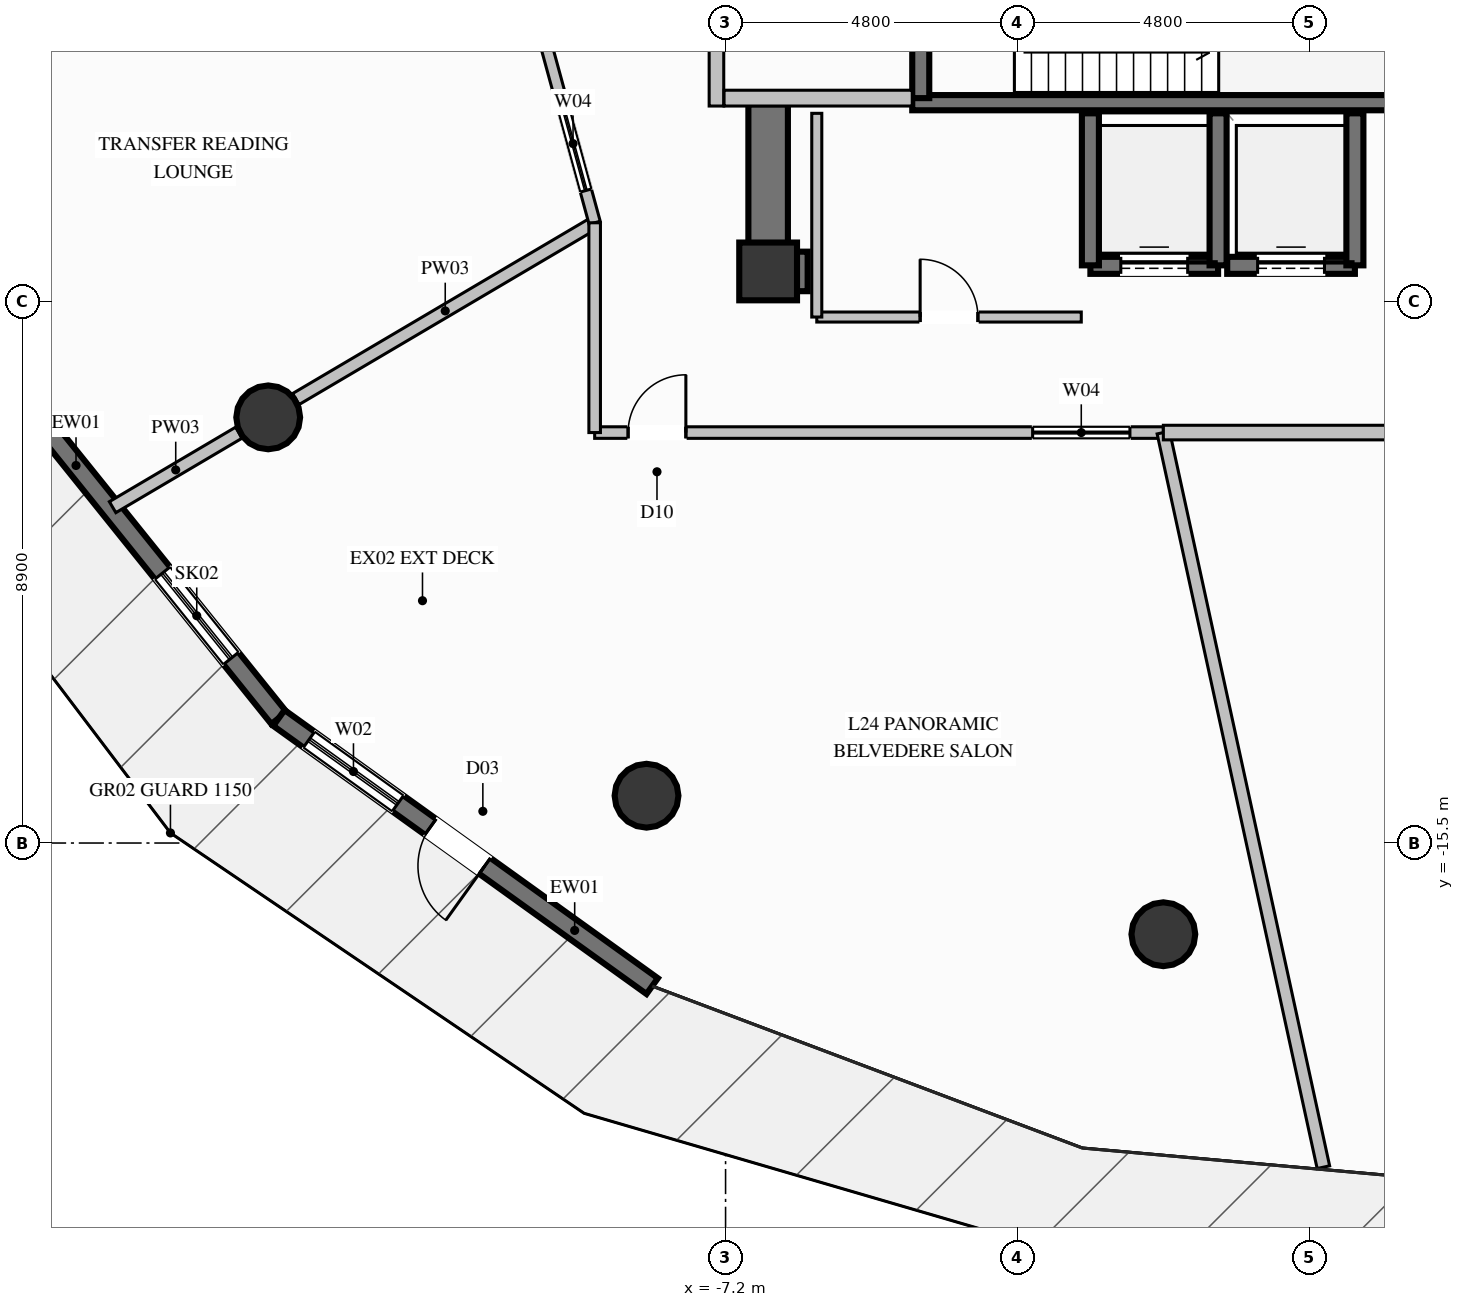
"""IFC4 building model, lengths in metres.
Left out: names, types, materials, properties, quantities, classifications, styles, units other than length and angle.
Written with IfcOpenShell. Run it as: python <this file> out.ifc"""

import sys

from ifc_helpers import new_model, si_unit, direction, frame, frame_2d, origin, origin_2d, place, context, subcontext, project, spatial, rectangle, circle, extrude, element, fill, save


model = new_model("IFC4")
c1 = context("Model", 3, precision=1e-05, world=origin(), true_north=direction((0.0, 1.0)))
c2 = subcontext(c1, "Body", "Model", "MODEL_VIEW")
j1 = project(units=[si_unit("LENGTHUNIT", "METRE"), si_unit("PLANEANGLEUNIT", "RADIAN")], contexts=[c1])
p1 = place(None, origin())
s1 = spatial("IfcSite", under=j1, at=p1, CompositionType="ELEMENT")
p2 = place(p1, origin())
s2 = spatial("IfcBuilding", under=s1, at=p2, CompositionType="ELEMENT")
p3 = place(p2, frame((0.0, 0.0, 98.0)))
s3 = spatial("IfcBuildingStorey", under=s2, at=p3, CompositionType="ELEMENT", Elevation=98.0)
p4 = place(p3, frame((-6.5, -6.1, 0.0), z_axis=(0.0, 0.0, 1.0), x_axis=(1.0, 0.0, 0.0)))
e1 = element("IfcColumn", 1, at=p4, inside=s3, PredefinedType="COLUMN", context=c2, shape_type="SweptSolid", body=[
    extrude(rectangle(XDim=0.95, YDim=0.95, at=origin_2d()), origin(), (0.0, 0.0, 1.0), 4.6),
])
p5 = place(p3, frame((-4.13, -3.325, 0.0), z_axis=(0.0, 0.0, 1.0), x_axis=(1.0, 0.0, 0.0)))
e2 = element("IfcWall", 2, at=p5, inside=s3, PredefinedType="SOLIDWALL", context=c2, shape_type="SweptSolid", body=[
    extrude(rectangle(XDim=8.26, YDim=0.25, at=frame_2d((4.13, 0.0))), origin(), (0.0, 0.0, 1.0), 4.6),
])
p6 = place(p3, frame((-6.175, -6.1, 0.0), z_axis=(0.0, 0.0, 1.0), x_axis=(1.0, 0.0, 0.0)))
e3 = element("IfcWall", 3, at=p6, inside=s3, PredefinedType="SHEAR", context=c2, shape_type="SweptSolid", body=[
    extrude(rectangle(XDim=0.325, YDim=0.65, at=frame_2d((0.163, 0.0))), origin(), (0.0, 0.0, 1.0), 4.6),
])
p7 = place(p3, frame((-6.5, -6.425, 0.0), z_axis=(0.0, 0.0, 1.0), x_axis=(0.0, 1.0, 0.0)))
e4 = element("IfcWall", 4, at=p7, inside=s3, PredefinedType="SHEAR", context=c2, shape_type="SweptSolid", body=[
    extrude(rectangle(XDim=3.075, YDim=0.65, at=frame_2d((1.538, 0.0))), origin(), (0.0, 0.0, 1.0), 4.6),
])
for number, where, z_axis, x_axis in (
    (5, (-14.722, -8.5, 0.0), (0.0, 0.0, 1.0), (1.0, 0.0, 0.0)),
    (6, (-8.5, -14.722, 0.0), (0.0, 0.0, 1.0), (1.0, 0.0, 0.0)),
    (7, (0.0, -17.0, 0.0), (0.0, 0.0, 1.0), (1.0, 0.0, 0.0)),
):
    element("IfcColumn", number, at=place(p3, frame(where, z_axis=z_axis, x_axis=x_axis)), inside=s3, PredefinedType="COLUMN", context=c2, shape_type="SweptSolid", body=[
        extrude(circle(Radius=0.525, at=origin_2d()), origin(), (0.0, 0.0, 1.0), 4.6),
    ])
p8 = place(p3, frame((-14.546, -13.443, 0.0), z_axis=(0.0, 0.0, 1.0), x_axis=(-0.626452409109, 0.77945967126, 0.0)))
e8 = element("IfcWall", 8, at=p8, inside=s3, PredefinedType="SOLIDWALL", context=c2, shape_type="SweptSolid", body=[
    extrude(rectangle(XDim=7.346, YDim=0.32, at=frame_2d((3.673, 0.0))), origin(), (0.0, 0.0, 1.0), 4.35),
])
p9 = place(p8, frame((1.257, 0.0, 0.6)))
e9 = element("IfcOpeningElement", 9, at=p9, cuts=e8, PredefinedType="OPENING", context=c2, shape_type="SweptSolid", body=[
    extrude(rectangle(XDim=1.8, YDim=2.2, at=frame_2d((0.9, 1.1))), frame((0.0, 0.17, 0.0), z_axis=(0.0, -1.0, 0.0), x_axis=(1.0, 0.0, 0.0)), (0.0, 0.0, 1.0), 0.34),
])
p10 = place(p3, frame((-8.407, -17.853, 0.0), z_axis=(0.0, 0.0, 1.0), x_axis=(-0.812167938926, 0.583423721647, 0.0)))
e10 = element("IfcWall", 10, at=p10, inside=s3, PredefinedType="SOLIDWALL", context=c2, shape_type="SweptSolid", body=[
    extrude(rectangle(XDim=7.559, YDim=0.32, at=frame_2d((3.779, 0.0))), origin(), (0.0, 0.0, 1.0), 4.35),
])
p11 = place(p10, frame((5.149, 0.0, 0.35)))
e11 = element("IfcOpeningElement", 11, at=p11, cuts=e10, PredefinedType="OPENING", context=c2, shape_type="SweptSolid", body=[
    extrude(rectangle(XDim=1.8, YDim=2.6, at=frame_2d((0.9, 1.3))), frame((0.0, 0.17, 0.0), z_axis=(0.0, -1.0, 0.0), x_axis=(1.0, 0.0, 0.0)), (0.0, 0.0, 1.0), 0.34),
])
p12 = place(p10, frame((3.389, 0.0, 0.0)))
e12 = element("IfcOpeningElement", 12, at=p12, cuts=e10, PredefinedType="OPENING", context=c2, shape_type="SweptSolid", body=[
    extrude(rectangle(XDim=1.1, YDim=2.2, at=frame_2d((0.55, 1.1))), frame((0.0, 0.17, 0.0), z_axis=(0.0, -1.0, 0.0), x_axis=(1.0, 0.0, 0.0)), (0.0, 0.0, 1.0), 0.34),
])
p13 = place(p3, frame((-1.2, -6.0, 0.0), z_axis=(0.0, 0.0, 1.0), x_axis=(1.0, 0.0, 0.0)))
e13 = element("IfcWall", 13, at=p13, inside=s3, PredefinedType="SOLIDWALL", context=c2, shape_type="SweptSolid", body=[
    extrude(rectangle(XDim=2.1, YDim=0.28, at=frame_2d((1.05, 0.0))), origin(), (0.0, 0.0, 1.0), 4.35),
])
p14 = place(p13, frame((0.5, 0.0, 0.0)))
e14 = element("IfcOpeningElement", 14, at=p14, cuts=e13, PredefinedType="OPENING", context=c2, shape_type="SweptSolid", body=[
    extrude(rectangle(XDim=1.1, YDim=2.2, at=frame_2d((0.55, 1.1))), frame((0.0, 0.15, 0.0), z_axis=(0.0, -1.0, 0.0), x_axis=(1.0, 0.0, 0.0)), (0.0, 0.0, 1.0), 0.3),
])
for number, where, z_axis, x_axis in (
    (15, (-1.2, -3.5, 0.0), (0.0, 0.0, 1.0), (0.0, -1.0, 0.0)),
    (16, (0.9, -6.0, 0.0), (0.0, 0.0, 1.0), (0.0, 1.0, 0.0)),
):
    element("IfcWall", number, at=place(p3, frame(where, z_axis=z_axis, x_axis=x_axis)), inside=s3, PredefinedType="SOLIDWALL", context=c2, shape_type="SweptSolid", body=[
        extrude(rectangle(XDim=2.5, YDim=0.28, at=frame_2d((1.25, 0.0))), origin(), (0.0, 0.0, 1.0), 4.35),
    ])
p15 = place(p3, frame((1.05, -6.0, 0.0), z_axis=(0.0, 0.0, 1.0), x_axis=(1.0, 0.0, 0.0)))
e17 = element("IfcWall", 17, at=p15, inside=s3, PredefinedType="SOLIDWALL", context=c2, shape_type="SweptSolid", body=[
    extrude(rectangle(XDim=2.1, YDim=0.28, at=frame_2d((1.05, 0.0))), origin(), (0.0, 0.0, 1.0), 4.35),
])
p16 = place(p15, frame((0.5, 0.0, 0.0)))
e18 = element("IfcOpeningElement", 18, at=p16, cuts=e17, PredefinedType="OPENING", context=c2, shape_type="SweptSolid", body=[
    extrude(rectangle(XDim=1.1, YDim=2.2, at=frame_2d((0.55, 1.1))), frame((0.0, 0.15, 0.0), z_axis=(0.0, -1.0, 0.0), x_axis=(1.0, 0.0, 0.0)), (0.0, 0.0, 1.0), 0.3),
])
p17 = place(p3, frame((3.15, -6.0, 0.0), z_axis=(0.0, 0.0, 1.0), x_axis=(0.0, 1.0, 0.0)))
e19 = element("IfcWall", 19, at=p17, inside=s3, PredefinedType="SOLIDWALL", context=c2, shape_type="SweptSolid", body=[
    extrude(rectangle(XDim=2.5, YDim=0.28, at=frame_2d((1.25, 0.0))), origin(), (0.0, 0.0, 1.0), 4.35),
])
p18 = place(p3, frame((-3.99, -3.25, 0.0), z_axis=(0.0, 0.0, 1.0), x_axis=(0.0, 1.0, 0.0)))
e20 = element("IfcWall", 20, at=p18, inside=s3, PredefinedType="SOLIDWALL", context=c2, shape_type="SweptSolid", body=[
    extrude(rectangle(XDim=5.46, YDim=0.28, at=frame_2d((2.73, 0.0))), origin(), (0.0, 0.0, 1.0), 4.35),
])
p19 = place(p18, frame((0.937, 0.0, 0.0)))
e21 = element("IfcOpeningElement", 21, at=p19, cuts=e20, PredefinedType="OPENING", context=c2, shape_type="SweptSolid", body=[
    extrude(rectangle(XDim=1.2, YDim=2.2, at=frame_2d((0.6, 1.1))), frame((0.0, 0.15, 0.0), z_axis=(0.0, -1.0, 0.0), x_axis=(1.0, 0.0, 0.0)), (0.0, 0.0, 1.0), 0.3),
])
p20 = place(p3, frame((-7.35, -3.38, 0.0), z_axis=(0.0, 0.0, 1.0), x_axis=(0.0, 1.0, 0.0)))
e22 = element("IfcWall", 22, at=p20, inside=s3, PredefinedType="PARTITIONING", context=c2, shape_type="SweptSolid", body=[
    extrude(rectangle(XDim=5.72, YDim=0.24, at=frame_2d((2.86, 0.0))), origin(), (0.0, 0.0, 1.0), 3.235),
])
p21 = place(p20, frame((1.599, 0.0, 0.0)))
e23 = element("IfcOpeningElement", 23, at=p21, cuts=e22, PredefinedType="OPENING", context=c2, shape_type="SweptSolid", body=[
    extrude(rectangle(XDim=1.15, YDim=2.2, at=frame_2d((0.575, 1.1))), frame((0.0, 0.13, 0.0), z_axis=(0.0, -1.0, 0.0), x_axis=(1.0, 0.0, 0.0)), (0.0, 0.0, 1.0), 0.26),
])
p22 = place(p3, frame((-7.225, -3.25, 0.0), z_axis=(0.0, 0.0, 1.0), x_axis=(1.0, 0.0, 0.0)))
e24 = element("IfcWall", 24, at=p22, inside=s3, PredefinedType="PARTITIONING", context=c2, shape_type="SweptSolid", body=[
    extrude(rectangle(XDim=3.095, YDim=0.26, at=frame_2d((1.548, 0.0))), origin(), (0.0, 0.0, 1.0), 4.35),
])
p23 = place(p3, frame((-5.7, -6.85, 0.0), z_axis=(0.0, 0.0, 1.0), x_axis=(1.0, 0.0, 0.0)))
e25 = element("IfcWall", 25, at=p23, inside=s3, PredefinedType="PARTITIONING", context=c2, shape_type="SweptSolid", body=[
    extrude(rectangle(XDim=4.35, YDim=0.165, at=frame_2d((2.175, 0.0))), origin(), (0.0, 0.0, 1.0), 3.235),
])
p24 = place(p23, frame((1.7, 0.0, 0.0)))
e26 = element("IfcOpeningElement", 26, at=p24, cuts=e25, PredefinedType="OPENING", context=c2, shape_type="SweptSolid", body=[
    extrude(rectangle(XDim=0.95, YDim=2.1, at=frame_2d((0.475, 1.05))), frame((0.0, 0.093, 0.0), z_axis=(0.0, -1.0, 0.0), x_axis=(1.0, 0.0, 0.0)), (0.0, 0.0, 1.0), 0.185),
])
p25 = place(p3, frame((-5.7, -3.5, 0.0), z_axis=(0.0, 0.0, 1.0), x_axis=(0.0, -1.0, 0.0)))
e27 = element("IfcWall", 27, at=p25, inside=s3, PredefinedType="PARTITIONING", context=c2, shape_type="SweptSolid", body=[
    extrude(rectangle(XDim=3.35, YDim=0.165, at=frame_2d((1.675, 0.0))), origin(), (0.0, 0.0, 1.0), 3.235),
])
p26 = place(p3, frame((-9.353, -5.3, 0.0), z_axis=(0.0, 0.0, 1.0), x_axis=(-0.86134190124, -0.508025717034, 0.0)))
e28 = element("IfcWall", 28, at=p26, inside=s3, PredefinedType="PARTITIONING", context=c2, shape_type="SweptSolid", body=[
    extrude(rectangle(XDim=5.706, YDim=0.21, at=frame_2d((2.853, 0.0))), origin(), (0.0, 0.0, 1.0), 3.718),
])
p27 = place(p3, frame((-15.205, -8.752, 0.0), z_axis=(0.0, 0.0, 1.0), x_axis=(-0.861214730318, -0.508241269756, 0.0)))
e29 = element("IfcWall", 29, at=p27, inside=s3, PredefinedType="PARTITIONING", context=c2, shape_type="SweptSolid", body=[
    extrude(rectangle(XDim=2.41, YDim=0.21, at=frame_2d((1.205, 0.0))), origin(), (0.0, 0.0, 1.0), 4.35),
])
p28 = place(p3, frame((-10.8, 0.0, 0.0), z_axis=(0.0, 0.0, 1.0), x_axis=(0.263380602271, -0.964692001805, 0.0)))
e30 = element("IfcWall", 30, at=p28, inside=s3, PredefinedType="PARTITIONING", context=c2, shape_type="SweptSolid", body=[
    extrude(rectangle(XDim=5.494, YDim=0.19, at=frame_2d((2.747, 0.0))), origin(), (0.0, 0.0, 1.0), 4.35),
])
p29 = place(p28, frame((0.55, 0.0, 0.0)))
e31 = element("IfcOpeningElement", 31, at=p29, cuts=e30, PredefinedType="OPENING", context=c2, shape_type="SweptSolid", body=[
    extrude(rectangle(XDim=0.95, YDim=2.1, at=frame_2d((0.475, 1.05))), frame((0.0, 0.105, 0.0), z_axis=(0.0, -1.0, 0.0), x_axis=(1.0, 0.0, 0.0)), (0.0, 0.0, 1.0), 0.21),
])
p30 = place(p28, frame((3.344, 0.0, 0.9)))
e32 = element("IfcOpeningElement", 32, at=p30, cuts=e30, PredefinedType="OPENING", context=c2, shape_type="SweptSolid", body=[
    extrude(rectangle(XDim=1.6, YDim=1.4, at=frame_2d((0.8, 0.7))), frame((0.0, 0.105, 0.0), z_axis=(0.0, -1.0, 0.0), x_axis=(1.0, 0.0, 0.0)), (0.0, 0.0, 1.0), 0.21),
])
p31 = place(p3, frame((-9.353, -8.75, 0.0), z_axis=(0.0, 0.0, 1.0), x_axis=(1.0, 0.0, 0.0)))
e33 = element("IfcWall", 33, at=p31, inside=s3, PredefinedType="PARTITIONING", context=c2, shape_type="SweptSolid", body=[
    extrude(rectangle(XDim=9.353, YDim=0.19, at=frame_2d((4.677, 0.0))), origin(), (0.0, 0.0, 1.0), 4.35),
])
p32 = place(p31, frame((0.55, 0.0, 0.0)))
e34 = element("IfcOpeningElement", 34, at=p32, cuts=e33, PredefinedType="OPENING", context=c2, shape_type="SweptSolid", body=[
    extrude(rectangle(XDim=0.95, YDim=2.1, at=frame_2d((0.475, 1.05))), frame((0.0, 0.105, 0.0), z_axis=(0.0, -1.0, 0.0), x_axis=(1.0, 0.0, 0.0)), (0.0, 0.0, 1.0), 0.21),
])
p33 = place(p31, frame((7.203, 0.0, 0.9)))
e35 = element("IfcOpeningElement", 35, at=p33, cuts=e33, PredefinedType="OPENING", context=c2, shape_type="SweptSolid", body=[
    extrude(rectangle(XDim=1.6, YDim=1.4, at=frame_2d((0.8, 0.7))), frame((0.0, 0.105, 0.0), z_axis=(0.0, -1.0, 0.0), x_axis=(1.0, 0.0, 0.0)), (0.0, 0.0, 1.0), 0.21),
])
p34 = place(p3, frame((-9.353, -5.3, 0.0), z_axis=(0.0, 0.0, 1.0), x_axis=(0.0, -1.0, 0.0)))
e36 = element("IfcWall", 36, at=p34, inside=s3, PredefinedType="PARTITIONING", context=c2, shape_type="SweptSolid", body=[
    extrude(rectangle(XDim=3.45, YDim=0.19, at=frame_2d((1.725, 0.0))), origin(), (0.0, 0.0, 1.0), 4.35),
])
p35 = place(p3, frame((0.0, -8.75, 0.0), z_axis=(0.0, 0.0, 1.0), x_axis=(0.212874748332, -0.97707949601, 0.0)))
e37 = element("IfcWall", 37, at=p35, inside=s3, PredefinedType="PARTITIONING", context=c2, shape_type="SweptSolid", body=[
    extrude(rectangle(XDim=12.365, YDim=0.21, at=frame_2d((6.182, 0.0))), origin(), (0.0, 0.0, 1.0), 4.35),
])
p36 = place(p3, frame((0.0, -8.75, 0.0), z_axis=(0.0, 0.0, 1.0), x_axis=(1.0, 0.0, 0.0)))
e38 = element("IfcWall", 38, at=p36, inside=s3, PredefinedType="PARTITIONING", context=c2, shape_type="SweptSolid", body=[
    extrude(rectangle(XDim=9.353, YDim=0.24, at=frame_2d((4.677, 0.0))), origin(), (0.0, 0.0, 1.0), 4.35),
])
p37 = place(p36, frame((4.202, 0.0, 0.0)))
e39 = element("IfcOpeningElement", 39, at=p37, cuts=e38, PredefinedType="OPENING", context=c2, shape_type="SweptSolid", body=[
    extrude(rectangle(XDim=0.95, YDim=2.1, at=frame_2d((0.475, 1.05))), frame((0.0, 0.13, 0.0), z_axis=(0.0, -1.0, 0.0), x_axis=(1.0, 0.0, 0.0)), (0.0, 0.0, 1.0), 0.26),
])
p38 = place(p9, origin())
e40 = element("IfcWindow", 40, at=p38, inside=s3, PartitioningType="SINGLE_PANEL", PredefinedType="SKYLIGHT", context=c2, shape_type="SweptSolid", body=[
    extrude(rectangle(XDim=1.8, YDim=2.2, at=frame_2d((0.9, 1.1))), frame((0.0, 0.03, 0.0), z_axis=(0.0, -1.0, 0.0), x_axis=(1.0, 0.0, 0.0)), (0.0, 0.0, 1.0), 0.06),
])
fill(e9, e40)
p39 = place(p11, origin())
e41 = element("IfcWindow", 41, at=p39, inside=s3, PartitioningType="SINGLE_PANEL", PredefinedType="WINDOW", context=c2, shape_type="SweptSolid", body=[
    extrude(rectangle(XDim=1.8, YDim=2.6, at=frame_2d((0.9, 1.3))), frame((0.0, 0.03, 0.0), z_axis=(0.0, -1.0, 0.0), x_axis=(1.0, 0.0, 0.0)), (0.0, 0.0, 1.0), 0.06),
])
fill(e11, e41)
p40 = place(p12, origin())
e42 = element("IfcDoor", 42, at=p40, inside=s3, OperationType="SINGLE_SWING_LEFT", PredefinedType="DOOR", context=c2, shape_type="SweptSolid", body=[
    extrude(rectangle(XDim=1.1, YDim=2.2, at=frame_2d((0.55, 1.1))), frame((0.0, 0.025, 0.0), z_axis=(0.0, -1.0, 0.0), x_axis=(1.0, 0.0, 0.0)), (0.0, 0.0, 1.0), 0.05),
])
fill(e12, e42)
p41 = place(p14, origin())
e43 = element("IfcDoor", 43, at=p41, inside=s3, OperationType="SLIDING_TO_LEFT", PredefinedType="DOOR", context=c2, shape_type="SweptSolid", body=[
    extrude(rectangle(XDim=1.1, YDim=2.2, at=frame_2d((0.55, 1.1))), frame((0.0, 0.025, 0.0), z_axis=(0.0, -1.0, 0.0), x_axis=(1.0, 0.0, 0.0)), (0.0, 0.0, 1.0), 0.05),
])
fill(e14, e43)
p42 = place(p16, origin())
e44 = element("IfcDoor", 44, at=p42, inside=s3, OperationType="SLIDING_TO_LEFT", PredefinedType="DOOR", context=c2, shape_type="SweptSolid", body=[
    extrude(rectangle(XDim=1.1, YDim=2.2, at=frame_2d((0.55, 1.1))), frame((0.0, 0.025, 0.0), z_axis=(0.0, -1.0, 0.0), x_axis=(1.0, 0.0, 0.0)), (0.0, 0.0, 1.0), 0.05),
])
fill(e18, e44)
p43 = place(p24, origin())
e45 = element("IfcDoor", 45, at=p43, inside=s3, OperationType="SINGLE_SWING_LEFT", PredefinedType="DOOR", context=c2, shape_type="SweptSolid", body=[
    extrude(rectangle(XDim=0.95, YDim=2.1, at=frame_2d((0.475, 1.05))), frame((0.0, 0.025, 0.0), z_axis=(0.0, -1.0, 0.0), x_axis=(1.0, 0.0, 0.0)), (0.0, 0.0, 1.0), 0.05),
])
fill(e26, e45)
p44 = place(p30, origin())
e46 = element("IfcWindow", 46, at=p44, inside=s3, PartitioningType="SINGLE_PANEL", PredefinedType="WINDOW", context=c2, shape_type="SweptSolid", body=[
    extrude(rectangle(XDim=1.6, YDim=1.4, at=frame_2d((0.8, 0.7))), frame((0.0, 0.03, 0.0), z_axis=(0.0, -1.0, 0.0), x_axis=(1.0, 0.0, 0.0)), (0.0, 0.0, 1.0), 0.06),
])
fill(e32, e46)
p45 = place(p32, origin())
e47 = element("IfcDoor", 47, at=p45, inside=s3, OperationType="SINGLE_SWING_RIGHT", PredefinedType="DOOR", context=c2, shape_type="SweptSolid", body=[
    extrude(rectangle(XDim=0.95, YDim=2.1, at=frame_2d((0.475, 1.05))), frame((0.0, 0.025, 0.0), z_axis=(0.0, -1.0, 0.0), x_axis=(1.0, 0.0, 0.0)), (0.0, 0.0, 1.0), 0.05),
])
fill(e34, e47)
p46 = place(p33, origin())
e48 = element("IfcWindow", 48, at=p46, inside=s3, PartitioningType="SINGLE_PANEL", PredefinedType="WINDOW", context=c2, shape_type="SweptSolid", body=[
    extrude(rectangle(XDim=1.6, YDim=1.4, at=frame_2d((0.8, 0.7))), frame((0.0, 0.03, 0.0), z_axis=(0.0, -1.0, 0.0), x_axis=(1.0, 0.0, 0.0)), (0.0, 0.0, 1.0), 0.06),
])
fill(e35, e48)
save(model, sys.argv[1])
